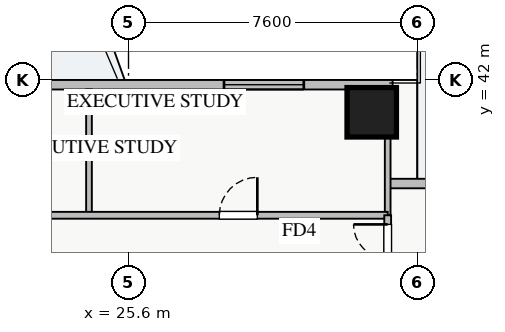
"""IFC4 building model, lengths in metres.
Left out: names, types, materials, properties, quantities, classifications, styles, units other than length and angle.
Written with IfcOpenShell. Run it as: python <this file> out.ifc"""

import sys

from ifc_helpers import new_model, si_unit, direction, frame, frame_2d, origin, origin_2d, place, context, subcontext, project, spatial, rectangle, extrude, source, transform, mapped, element, fill, save


model = new_model("IFC4")
c1 = context("Model", 3, precision=1e-05, world=origin(), true_north=direction((0.0, 1.0)))
c2 = subcontext(c1, "Body", "Model", "MODEL_VIEW")
j1 = project(units=[si_unit("LENGTHUNIT", "METRE"), si_unit("PLANEANGLEUNIT", "RADIAN")], contexts=[c1])
p1 = place(None, origin())
s1 = spatial("IfcSite", under=j1, at=p1, CompositionType="ELEMENT")
p2 = place(p1, origin())
s2 = spatial("IfcBuilding", under=s1, at=p2, CompositionType="ELEMENT")
p3 = place(p2, frame((0.0, 0.0, 32.75)))
s3 = spatial("IfcBuildingStorey", under=s2, at=p3, CompositionType="ELEMENT", Elevation=32.75)
m1 = source(origin(), c2, "Body", "SweptSolid", [
    extrude(rectangle(XDim=1.3, YDim=1.3, at=origin_2d()), origin(), (0.0, 0.0, 1.0), 3.25),
])
p4 = place(p3, frame((32.0, 41.15, 0.0), z_axis=(0.0, 0.0, 1.0), x_axis=(1.0, 0.0, 0.0)))
e1 = element("IfcColumn", 1, at=p4, inside=s3, PredefinedType="COLUMN", context=c2, shape_type="MappedRepresentation", body=[
    mapped(m1, transform((0.0, 0.0, 0.0), x_axis=(1.0, 0.0, 0.0), y_axis=(0.0, 1.0, 0.0), z_axis=(0.0, 0.0, 1.0), scale=1.0)),
])
p5 = place(p3, frame((5.45, 41.875, 0.0), z_axis=(0.0, 0.0, 1.0), x_axis=(1.0, 0.0, 0.0)))
e2 = element("IfcWall", 2, at=p5, inside=s3, PredefinedType="STANDARD", context=c2, shape_type="SweptSolid", body=[
    extrude(rectangle(XDim=27.1, YDim=0.25, at=frame_2d((13.55, 0.0))), origin(), (0.0, 0.0, 1.0), 2.61),
])
p6 = place(p5, frame((14.4, 0.0, 0.0)))
e3 = element("IfcOpeningElement", 3, at=p6, cuts=e2, PredefinedType="OPENING", context=c2, shape_type="SweptSolid", body=[
    extrude(rectangle(XDim=1.2, YDim=2.1, at=frame_2d((0.6, 1.05))), frame((0.0, 0.135, 0.0), z_axis=(0.0, -1.0, 0.0), x_axis=(1.0, 0.0, 0.0)), (0.0, 0.0, 1.0), 0.27),
])
p7 = place(p5, frame((1.365, 0.0, 0.9)))
e4 = element("IfcOpeningElement", 4, at=p7, cuts=e2, PredefinedType="OPENING", context=c2, shape_type="SweptSolid", body=[
    extrude(rectangle(XDim=1.8, YDim=1.5, at=frame_2d((0.9, 0.75))), frame((0.0, 0.135, 0.0), z_axis=(0.0, -1.0, 0.0), x_axis=(1.0, 0.0, 0.0)), (0.0, 0.0, 1.0), 0.27),
])
p8 = place(p5, frame((9.263, 0.0, 0.9)))
e5 = element("IfcOpeningElement", 5, at=p8, cuts=e2, PredefinedType="OPENING", context=c2, shape_type="SweptSolid", body=[
    extrude(rectangle(XDim=1.8, YDim=1.45, at=frame_2d((0.9, 0.725))), frame((0.0, 0.135, 0.0), z_axis=(0.0, -1.0, 0.0), x_axis=(1.0, 0.0, 0.0)), (0.0, 0.0, 1.0), 0.27),
])
p9 = place(p5, frame((16.188, 0.0, 0.9)))
e6 = element("IfcOpeningElement", 6, at=p9, cuts=e2, PredefinedType="OPENING", context=c2, shape_type="SweptSolid", body=[
    extrude(rectangle(XDim=1.5, YDim=1.45, at=frame_2d((0.75, 0.725))), frame((0.0, 0.135, 0.0), z_axis=(0.0, -1.0, 0.0), x_axis=(1.0, 0.0, 0.0)), (0.0, 0.0, 1.0), 0.27),
])
p10 = place(p5, frame((22.663, 0.0, 0.9)))
e7 = element("IfcOpeningElement", 7, at=p10, cuts=e2, PredefinedType="OPENING", context=c2, shape_type="SweptSolid", body=[
    extrude(rectangle(XDim=2.1, YDim=1.48, at=frame_2d((1.05, 0.74))), frame((0.0, 0.135, 0.0), z_axis=(0.0, -1.0, 0.0), x_axis=(1.0, 0.0, 0.0)), (0.0, 0.0, 1.0), 0.27),
])
p11 = place(p5, frame((5.149, 0.0, 0.9)))
e8 = element("IfcOpeningElement", 8, at=p11, cuts=e2, PredefinedType="OPENING", context=c2, shape_type="SweptSolid", body=[
    extrude(rectangle(XDim=2.4, YDim=1.5, at=frame_2d((1.2, 0.75))), frame((0.0, 0.135, 0.0), z_axis=(0.0, -1.0, 0.0), x_axis=(1.0, 0.0, 0.0)), (0.0, 0.0, 1.0), 0.27),
])
p12 = place(p3, frame((32.475, 39.275, 0.0), z_axis=(0.0, 0.0, 1.0), x_axis=(1.0, 0.0, 0.0)))
e9 = element("IfcWall", 9, at=p12, inside=s3, PredefinedType="STANDARD", context=c2, shape_type="SweptSolid", body=[
    extrude(rectangle(XDim=2.8, YDim=0.25, at=frame_2d((1.4, 0.0))), origin(), (0.0, 0.0, 1.0), 2.61),
])
p13 = place(p12, frame((1.05, 0.0, 0.0)))
e10 = element("IfcOpeningElement", 10, at=p13, cuts=e9, PredefinedType="OPENING", context=c2, shape_type="SweptSolid", body=[
    extrude(rectangle(XDim=1.2, YDim=2.1, at=frame_2d((0.6, 1.05))), frame((0.0, 0.135, 0.0), z_axis=(0.0, -1.0, 0.0), x_axis=(1.0, 0.0, 0.0)), (0.0, 0.0, 1.0), 0.27),
])
for number, where, z_axis, x_axis in (
    (11, (24.56, 38.44, 0.0), (0.0, 0.0, 1.0), (0.0, 1.0, 0.0)),
    (12, (32.42, 38.44, 0.0), (0.0, 0.0, 1.0), (0.0, 1.0, 0.0)),
):
    element("IfcWall", number, at=place(p3, frame(where, z_axis=z_axis, x_axis=x_axis)), inside=s3, PredefinedType="PARTITIONING", context=c2, shape_type="SweptSolid", body=[
        extrude(rectangle(XDim=3.31, YDim=0.15, at=frame_2d((1.655, 0.0))), origin(), (0.0, 0.0, 1.0), 3.07),
    ])
p14 = place(p3, frame((8.85, 38.44, 0.0), z_axis=(0.0, 0.0, 1.0), x_axis=(1.0, 0.0, 0.0)))
e13 = element("IfcWall", 13, at=p14, inside=s3, PredefinedType="PARTITIONING", context=c2, shape_type="SweptSolid", body=[
    extrude(rectangle(XDim=23.57, YDim=0.18, at=frame_2d((11.785, 0.0))), origin(), (0.0, 0.0, 1.0), 3.07),
])
p15 = place(p14, frame((3.77, 0.0, 0.0)))
e14 = element("IfcOpeningElement", 14, at=p15, cuts=e13, PredefinedType="OPENING", context=c2, shape_type="SweptSolid", body=[
    extrude(rectangle(XDim=1.0, YDim=2.05, at=frame_2d((0.5, 1.025))), frame((0.0, 0.1, 0.0), z_axis=(0.0, -1.0, 0.0), x_axis=(1.0, 0.0, 0.0)), (0.0, 0.0, 1.0), 0.2),
])
p16 = place(p14, frame((11.625, 0.0, 0.0)))
e15 = element("IfcOpeningElement", 15, at=p16, cuts=e13, PredefinedType="OPENING", context=c2, shape_type="SweptSolid", body=[
    extrude(rectangle(XDim=1.0, YDim=2.05, at=frame_2d((0.5, 1.025))), frame((0.0, 0.1, 0.0), z_axis=(0.0, -1.0, 0.0), x_axis=(1.0, 0.0, 0.0)), (0.0, 0.0, 1.0), 0.2),
])
p17 = place(p14, frame((19.14, 0.0, 0.0)))
e16 = element("IfcOpeningElement", 16, at=p17, cuts=e13, PredefinedType="OPENING", context=c2, shape_type="SweptSolid", body=[
    extrude(rectangle(XDim=1.0, YDim=2.05, at=frame_2d((0.5, 1.025))), frame((0.0, 0.1, 0.0), z_axis=(0.0, -1.0, 0.0), x_axis=(1.0, 0.0, 0.0)), (0.0, 0.0, 1.0), 0.2),
])
p18 = place(p3, frame((32.42, 7.21, 0.0), z_axis=(0.0, 0.0, 1.0), x_axis=(0.0, 1.0, 0.0)))
e17 = element("IfcWall", 17, at=p18, inside=s3, PredefinedType="PARTITIONING", context=c2, shape_type="SweptSolid", body=[
    extrude(rectangle(XDim=31.23, YDim=0.18, at=frame_2d((15.615, 0.0))), origin(), (0.0, 0.0, 1.0), 2.771),
])
p19 = place(p18, frame((30.09, 0.0, 0.0)))
e18 = element("IfcOpeningElement", 18, at=p19, cuts=e17, PredefinedType="OPENING", context=c2, shape_type="SweptSolid", body=[
    extrude(rectangle(XDim=0.9, YDim=2.05, at=frame_2d((0.45, 1.025))), frame((0.0, 0.1, 0.0), z_axis=(0.0, -1.0, 0.0), x_axis=(1.0, 0.0, 0.0)), (0.0, 0.0, 1.0), 0.2),
])
p20 = place(p18, frame((0.415, 0.0, 0.0)))
e19 = element("IfcOpeningElement", 19, at=p20, cuts=e17, PredefinedType="OPENING", context=c2, shape_type="SweptSolid", body=[
    extrude(rectangle(XDim=0.9, YDim=2.05, at=frame_2d((0.45, 1.025))), frame((0.0, 0.1, 0.0), z_axis=(0.0, -1.0, 0.0), x_axis=(1.0, 0.0, 0.0)), (0.0, 0.0, 1.0), 0.2),
])
p21 = place(p18, frame((3.465, 0.0, 0.0)))
e20 = element("IfcOpeningElement", 20, at=p21, cuts=e17, PredefinedType="OPENING", context=c2, shape_type="SweptSolid", body=[
    extrude(rectangle(XDim=1.0, YDim=2.05, at=frame_2d((0.5, 1.025))), frame((0.0, 0.1, 0.0), z_axis=(0.0, -1.0, 0.0), x_axis=(1.0, 0.0, 0.0)), (0.0, 0.0, 1.0), 0.2),
])
p22 = place(p18, frame((12.635, 0.0, 0.0)))
e21 = element("IfcOpeningElement", 21, at=p22, cuts=e17, PredefinedType="OPENING", context=c2, shape_type="SweptSolid", body=[
    extrude(rectangle(XDim=1.0, YDim=2.05, at=frame_2d((0.5, 1.025))), frame((0.0, 0.1, 0.0), z_axis=(0.0, -1.0, 0.0), x_axis=(1.0, 0.0, 0.0)), (0.0, 0.0, 1.0), 0.2),
])
p23 = place(p18, frame((22.5, 0.0, 0.0)))
e22 = element("IfcOpeningElement", 22, at=p23, cuts=e17, PredefinedType="OPENING", context=c2, shape_type="SweptSolid", body=[
    extrude(rectangle(XDim=1.0, YDim=2.05, at=frame_2d((0.5, 1.025))), frame((0.0, 0.1, 0.0), z_axis=(0.0, -1.0, 0.0), x_axis=(1.0, 0.0, 0.0)), (0.0, 0.0, 1.0), 0.2),
])
m2 = source(origin(), c2, "Body", "SweptSolid", [
    extrude(rectangle(XDim=2.1, YDim=1.48, at=frame_2d((1.05, 0.74))), frame((0.0, 0.03, 0.0), z_axis=(0.0, -1.0, 0.0), x_axis=(1.0, 0.0, 0.0)), (0.0, 0.0, 1.0), 0.06),
])
p24 = place(p10, origin())
e23 = element("IfcWindow", 23, at=p24, inside=s3, PartitioningType="TRIPLE_PANEL_VERTICAL", PredefinedType="WINDOW", context=c2, shape_type="MappedRepresentation", body=[
    mapped(m2, transform((0.0, 0.0, 0.0), x_axis=(1.0, 0.0, 0.0), y_axis=(0.0, 1.0, 0.0), z_axis=(0.0, 0.0, 1.0), scale=1.0)),
])
fill(e7, e23)
m3 = source(origin(), c2, "Body", "SweptSolid", [
    extrude(rectangle(XDim=1.0, YDim=2.05, at=frame_2d((0.5, 1.025))), frame((0.0, 0.025, 0.0), z_axis=(0.0, -1.0, 0.0), x_axis=(1.0, 0.0, 0.0)), (0.0, 0.0, 1.0), 0.05),
])
p25 = place(p17, origin())
e24 = element("IfcDoor", 24, at=p25, inside=s3, OperationType="SINGLE_SWING_RIGHT", PredefinedType="DOOR", context=c2, shape_type="MappedRepresentation", body=[
    mapped(m3, transform((0.0, 0.0, 0.0), x_axis=(1.0, 0.0, 0.0), y_axis=(0.0, 1.0, 0.0), z_axis=(0.0, 0.0, 1.0), scale=1.0)),
])
fill(e16, e24)
m4 = source(origin(), c2, "Body", "SweptSolid", [
    extrude(rectangle(XDim=0.9, YDim=2.05, at=frame_2d((0.45, 1.025))), frame((0.0, 0.025, 0.0), z_axis=(0.0, -1.0, 0.0), x_axis=(1.0, 0.0, 0.0)), (0.0, 0.0, 1.0), 0.05),
])
p26 = place(p19, origin())
e25 = element("IfcDoor", 25, at=p26, inside=s3, OperationType="SINGLE_SWING_RIGHT", PredefinedType="DOOR", context=c2, shape_type="MappedRepresentation", body=[
    mapped(m4, transform((0.0, 0.0, 0.0), x_axis=(1.0, 0.0, 0.0), y_axis=(0.0, 1.0, 0.0), z_axis=(0.0, 0.0, 1.0), scale=1.0)),
])
fill(e18, e25)
save(model, sys.argv[1])
